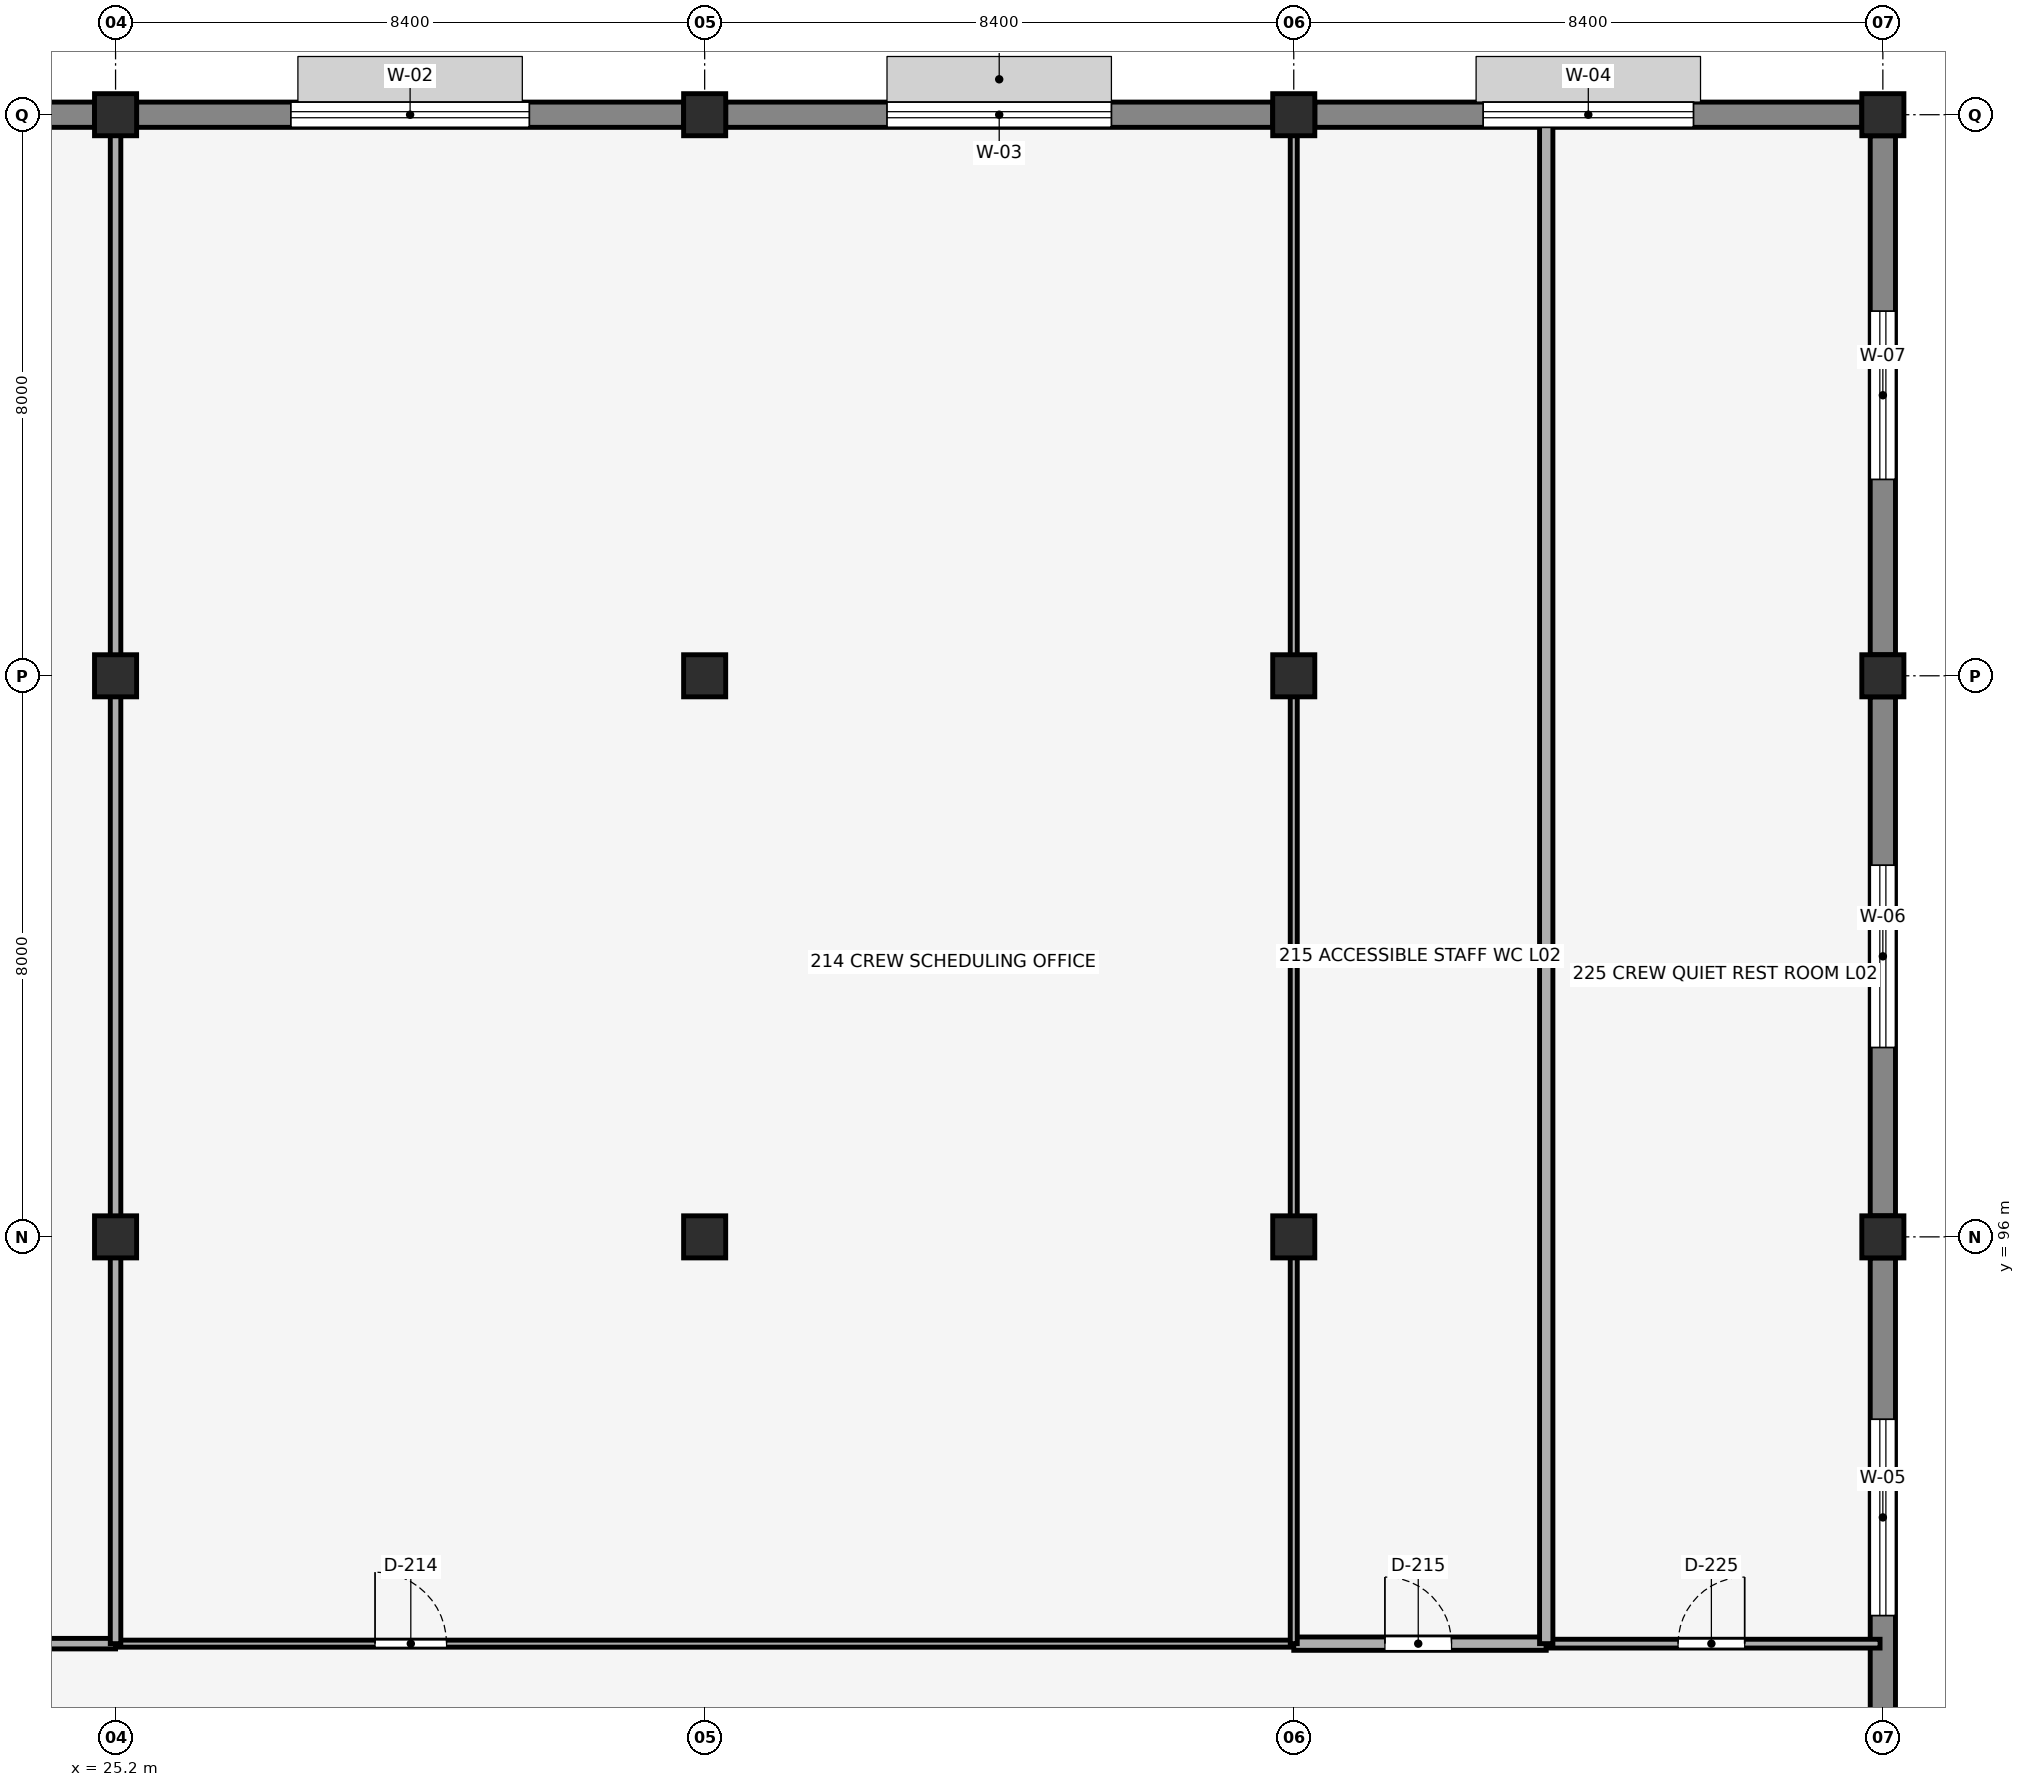
"""IFC4 building model, lengths in metres.
Left out: names, types, materials, properties, quantities, classifications, styles, units other than length and angle.
Written with IfcOpenShell. Run it as: python <this file> out.ifc"""

import sys

from ifc_helpers import new_model, si_unit, direction, frame, frame_2d, origin, origin_2d, place, context, subcontext, project, spatial, rectangle, extrude, element, fill, save


model = new_model("IFC4")
c1 = context("Model", 3, precision=1e-05, world=origin(), true_north=direction((0.0, 1.0)))
c2 = subcontext(c1, "Body", "Model", "MODEL_VIEW")
j1 = project(units=[si_unit("LENGTHUNIT", "METRE"), si_unit("PLANEANGLEUNIT", "RADIAN")], contexts=[c1])
p1 = place(None, origin())
s1 = spatial("IfcSite", under=j1, at=p1, CompositionType="ELEMENT")
p2 = place(p1, origin())
s2 = spatial("IfcBuilding", under=s1, at=p2, CompositionType="ELEMENT")
p3 = place(p2, frame((0.0, 0.0, 9.52)))
s3 = spatial("IfcBuildingStorey", under=s2, at=p3, CompositionType="ELEMENT", Elevation=9.52)
for number, where, z_axis, x_axis in (
    (1, (25.2, 96.0, 0.0), (0.0, 0.0, 1.0), (1.0, 0.0, 0.0)),
    (2, (25.2, 104.0, 0.0), (0.0, 0.0, 1.0), (1.0, 0.0, 0.0)),
    (3, (25.2, 112.0, 0.0), (0.0, 0.0, 1.0), (1.0, 0.0, 0.0)),
    (4, (33.6, 96.0, 0.0), (0.0, 0.0, 1.0), (1.0, 0.0, 0.0)),
    (5, (33.6, 104.0, 0.0), (0.0, 0.0, 1.0), (1.0, 0.0, 0.0)),
    (6, (33.6, 112.0, 0.0), (0.0, 0.0, 1.0), (1.0, 0.0, 0.0)),
    (7, (42.0, 96.0, 0.0), (0.0, 0.0, 1.0), (1.0, 0.0, 0.0)),
    (8, (42.0, 104.0, 0.0), (0.0, 0.0, 1.0), (1.0, 0.0, 0.0)),
    (9, (42.0, 112.0, 0.0), (0.0, 0.0, 1.0), (1.0, 0.0, 0.0)),
    (10, (50.4, 96.0, 0.0), (0.0, 0.0, 1.0), (1.0, 0.0, 0.0)),
    (11, (50.4, 104.0, 0.0), (0.0, 0.0, 1.0), (1.0, 0.0, 0.0)),
    (12, (50.4, 112.0, 0.0), (0.0, 0.0, 1.0), (1.0, 0.0, 0.0)),
):
    element("IfcColumn", number, at=place(p3, frame(where, z_axis=z_axis, x_axis=x_axis)), inside=s3, PredefinedType="COLUMN", context=c2, shape_type="SweptSolid", body=[
        extrude(rectangle(XDim=0.6, YDim=0.6, at=origin_2d()), origin(), (0.0, 0.0, 1.0), 3.57),
    ])
p4 = place(p3, frame((33.9, 112.0, 0.0), z_axis=(0.0, 0.0, 1.0), x_axis=(1.0, 0.0, 0.0)))
e13 = element("IfcWall", 13, at=p4, inside=s3, PredefinedType="SOLIDWALL", context=c2, shape_type="SweptSolid", body=[
    extrude(rectangle(XDim=7.8, YDim=0.36, at=frame_2d((3.9, 0.0))), origin(), (0.0, 0.0, 1.0), 3.27),
])
p5 = place(p4, frame((2.3, 0.0, 0.9), z_axis=(0.0, 0.0, 1.0), x_axis=(1.0, 0.0, 0.0)))
e14 = element("IfcOpeningElement", 14, at=p5, cuts=e13, PredefinedType="OPENING", context=c2, shape_type="SweptSolid", body=[
    extrude(rectangle(XDim=3.2, YDim=1.65, at=frame_2d((1.6, 0.825))), frame((0.0, 0.19, 0.0), z_axis=(0.0, -1.0, 0.0), x_axis=(1.0, 0.0, 0.0)), (0.0, 0.0, 1.0), 0.38),
])
p6 = place(p3, frame((42.3, 112.0, 0.0), z_axis=(0.0, 0.0, 1.0), x_axis=(1.0, 0.0, 0.0)))
e15 = element("IfcWall", 15, at=p6, inside=s3, PredefinedType="SOLIDWALL", context=c2, shape_type="SweptSolid", body=[
    extrude(rectangle(XDim=7.8, YDim=0.36, at=frame_2d((3.9, 0.0))), origin(), (0.0, 0.0, 1.0), 3.27),
])
p7 = place(p6, frame((2.4, 0.0, 0.9), z_axis=(0.0, 0.0, 1.0), x_axis=(1.0, 0.0, 0.0)))
e16 = element("IfcOpeningElement", 16, at=p7, cuts=e15, PredefinedType="OPENING", context=c2, shape_type="SweptSolid", body=[
    extrude(rectangle(XDim=3.0, YDim=1.65, at=frame_2d((1.5, 0.825))), frame((0.0, 0.19, 0.0), z_axis=(0.0, -1.0, 0.0), x_axis=(1.0, 0.0, 0.0)), (0.0, 0.0, 1.0), 0.38),
])
p8 = place(p3, frame((50.4, 88.3, 0.0), z_axis=(0.0, 0.0, 1.0), x_axis=(0.0, 1.0, 0.0)))
e17 = element("IfcWall", 17, at=p8, inside=s3, PredefinedType="SOLIDWALL", context=c2, shape_type="SweptSolid", body=[
    extrude(rectangle(XDim=7.4, YDim=0.36, at=frame_2d((3.7, 0.0))), origin(), (0.0, 0.0, 1.0), 3.219),
])
p9 = place(p8, frame((2.3, 0.0, 0.9), z_axis=(0.0, 0.0, 1.0), x_axis=(1.0, 0.0, 0.0)))
e18 = element("IfcOpeningElement", 18, at=p9, cuts=e17, PredefinedType="OPENING", context=c2, shape_type="SweptSolid", body=[
    extrude(rectangle(XDim=2.8, YDim=1.6, at=frame_2d((1.4, 0.8))), frame((0.0, 0.19, 0.0), z_axis=(0.0, -1.0, 0.0), x_axis=(1.0, 0.0, 0.0)), (0.0, 0.0, 1.0), 0.38),
])
p10 = place(p3, frame((50.4, 96.3, 0.0), z_axis=(0.0, 0.0, 1.0), x_axis=(0.0, 1.0, 0.0)))
e19 = element("IfcWall", 19, at=p10, inside=s3, PredefinedType="SOLIDWALL", context=c2, shape_type="SweptSolid", body=[
    extrude(rectangle(XDim=7.4, YDim=0.36, at=frame_2d((3.7, 0.0))), origin(), (0.0, 0.0, 1.0), 3.219),
])
p11 = place(p10, frame((2.4, 0.0, 0.9), z_axis=(0.0, 0.0, 1.0), x_axis=(1.0, 0.0, 0.0)))
e20 = element("IfcOpeningElement", 20, at=p11, cuts=e19, PredefinedType="OPENING", context=c2, shape_type="SweptSolid", body=[
    extrude(rectangle(XDim=2.6, YDim=1.8, at=frame_2d((1.3, 0.9))), frame((0.0, 0.19, 0.0), z_axis=(0.0, -1.0, 0.0), x_axis=(1.0, 0.0, 0.0)), (0.0, 0.0, 1.0), 0.38),
])
p12 = place(p3, frame((50.4, 104.3, 0.0), z_axis=(0.0, 0.0, 1.0), x_axis=(0.0, 1.0, 0.0)))
e21 = element("IfcWall", 21, at=p12, inside=s3, PredefinedType="SOLIDWALL", context=c2, shape_type="SweptSolid", body=[
    extrude(rectangle(XDim=7.4, YDim=0.36, at=frame_2d((3.7, 0.0))), origin(), (0.0, 0.0, 1.0), 3.219),
])
p13 = place(p12, frame((2.5, 0.0, 0.9), z_axis=(0.0, 0.0, 1.0), x_axis=(1.0, 0.0, 0.0)))
e22 = element("IfcOpeningElement", 22, at=p13, cuts=e21, PredefinedType="OPENING", context=c2, shape_type="SweptSolid", body=[
    extrude(rectangle(XDim=2.4, YDim=1.75, at=frame_2d((1.2, 0.875))), frame((0.0, 0.19, 0.0), z_axis=(0.0, -1.0, 0.0), x_axis=(1.0, 0.0, 0.0)), (0.0, 0.0, 1.0), 0.38),
])
p14 = place(p3, frame((17.1, 112.0, 0.0), z_axis=(0.0, 0.0, 1.0), x_axis=(1.0, 0.0, 0.0)))
e23 = element("IfcWall", 23, at=p14, inside=s3, PredefinedType="SOLIDWALL", context=c2, shape_type="SweptSolid", body=[
    extrude(rectangle(XDim=7.8, YDim=0.36, at=frame_2d((3.9, 0.0))), origin(), (0.0, 0.0, 1.0), 3.27),
])
p15 = place(p14, frame((2.1, 0.0, 0.9), z_axis=(0.0, 0.0, 1.0), x_axis=(1.0, 0.0, 0.0)))
e24 = element("IfcOpeningElement", 24, at=p15, cuts=e23, PredefinedType="OPENING", context=c2, shape_type="SweptSolid", body=[
    extrude(rectangle(XDim=3.6, YDim=1.8, at=frame_2d((1.8, 0.9))), frame((0.0, 0.19, 0.0), z_axis=(0.0, -1.0, 0.0), x_axis=(1.0, 0.0, 0.0)), (0.0, 0.0, 1.0), 0.38),
])
p16 = place(p3, frame((25.5, 112.0, 0.0), z_axis=(0.0, 0.0, 1.0), x_axis=(1.0, 0.0, 0.0)))
e25 = element("IfcWall", 25, at=p16, inside=s3, PredefinedType="SOLIDWALL", context=c2, shape_type="SweptSolid", body=[
    extrude(rectangle(XDim=7.8, YDim=0.36, at=frame_2d((3.9, 0.0))), origin(), (0.0, 0.0, 1.0), 3.27),
])
p17 = place(p16, frame((2.2, 0.0, 0.9), z_axis=(0.0, 0.0, 1.0), x_axis=(1.0, 0.0, 0.0)))
e26 = element("IfcOpeningElement", 26, at=p17, cuts=e25, PredefinedType="OPENING", context=c2, shape_type="SweptSolid", body=[
    extrude(rectangle(XDim=3.4, YDim=1.7, at=frame_2d((1.7, 0.85))), frame((0.0, 0.19, 0.0), z_axis=(0.0, -1.0, 0.0), x_axis=(1.0, 0.0, 0.0)), (0.0, 0.0, 1.0), 0.38),
])
p18 = place(p3, frame((16.8, 90.2, 0.0), z_axis=(0.0, 0.0, 1.0), x_axis=(1.0, 0.0, 0.0)))
e27 = element("IfcWall", 27, at=p18, inside=s3, PredefinedType="PARTITIONING", context=c2, shape_type="SweptSolid", body=[
    extrude(rectangle(XDim=8.4, YDim=0.15, at=frame_2d((4.2, 0.0))), origin(), (0.0, 0.0, 1.0), 3.57),
])
p19 = place(p18, frame((3.7, 0.0, 0.0), z_axis=(0.0, 0.0, 1.0), x_axis=(1.0, 0.0, 0.0)))
e28 = element("IfcOpeningElement", 28, at=p19, cuts=e27, PredefinedType="OPENING", context=c2, shape_type="SweptSolid", body=[
    extrude(rectangle(XDim=1.08, YDim=2.18, at=frame_2d((0.54, 1.09))), frame((0.0, 0.085, 0.0), z_axis=(0.0, -1.0, 0.0), x_axis=(1.0, 0.0, 0.0)), (0.0, 0.0, 1.0), 0.17),
])
p20 = place(p3, frame((25.2, 90.2, 0.0), z_axis=(0.0, 0.0, 1.0), x_axis=(1.0, 0.0, 0.0)))
e29 = element("IfcWall", 29, at=p20, inside=s3, PredefinedType="PARTITIONING", context=c2, shape_type="SweptSolid", body=[
    extrude(rectangle(XDim=16.8, YDim=0.1, at=frame_2d((8.4, 0.0))), origin(), (0.0, 0.0, 1.0), 3.57),
])
p21 = place(p20, frame((3.7, 0.0, 0.0), z_axis=(0.0, 0.0, 1.0), x_axis=(1.0, 0.0, 0.0)))
e30 = element("IfcOpeningElement", 30, at=p21, cuts=e29, PredefinedType="OPENING", context=c2, shape_type="SweptSolid", body=[
    extrude(rectangle(XDim=1.02, YDim=2.16, at=frame_2d((0.51, 1.08))), frame((0.0, 0.06, 0.0), z_axis=(0.0, -1.0, 0.0), x_axis=(1.0, 0.0, 0.0)), (0.0, 0.0, 1.0), 0.12),
])
p22 = place(p3, frame((42.0, 90.2, 0.0), z_axis=(0.0, 0.0, 1.0), x_axis=(1.0, 0.0, 0.0)))
e31 = element("IfcWall", 31, at=p22, inside=s3, PredefinedType="PLUMBINGWALL", context=c2, shape_type="SweptSolid", body=[
    extrude(rectangle(XDim=3.6, YDim=0.19, at=frame_2d((1.8, 0.0))), origin(), (0.0, 0.0, 1.0), 3.57),
])
p23 = place(p22, frame((1.3, 0.0, 0.0), z_axis=(0.0, 0.0, 1.0), x_axis=(1.0, 0.0, 0.0)))
e32 = element("IfcOpeningElement", 32, at=p23, cuts=e31, PredefinedType="OPENING", context=c2, shape_type="SweptSolid", body=[
    extrude(rectangle(XDim=0.95, YDim=2.15, at=frame_2d((0.475, 1.075))), frame((0.0, 0.105, 0.0), z_axis=(0.0, -1.0, 0.0), x_axis=(1.0, 0.0, 0.0)), (0.0, 0.0, 1.0), 0.21),
])
p24 = place(p3, frame((45.6, 90.2, 0.0), z_axis=(0.0, 0.0, 1.0), x_axis=(1.0, 0.0, 0.0)))
e33 = element("IfcWall", 33, at=p24, inside=s3, PredefinedType="PARTITIONING", context=c2, shape_type="SweptSolid", body=[
    extrude(rectangle(XDim=4.76, YDim=0.125, at=frame_2d((2.38, 0.0))), origin(), (0.0, 0.0, 1.0), 3.57),
])
p25 = place(p24, frame((1.88, 0.0, 0.0), z_axis=(0.0, 0.0, 1.0), x_axis=(1.0, 0.0, 0.0)))
e34 = element("IfcOpeningElement", 34, at=p25, cuts=e33, PredefinedType="OPENING", context=c2, shape_type="SweptSolid", body=[
    extrude(rectangle(XDim=0.95, YDim=2.15, at=frame_2d((0.475, 1.075))), frame((0.0, 0.073, 0.0), z_axis=(0.0, -1.0, 0.0), x_axis=(1.0, 0.0, 0.0)), (0.0, 0.0, 1.0), 0.145),
])
p26 = place(p3, frame((25.2, 90.2, 0.0), z_axis=(0.0, 0.0, 1.0), x_axis=(0.0, 1.0, 0.0)))
e35 = element("IfcWall", 35, at=p26, inside=s3, PredefinedType="PARTITIONING", context=c2, shape_type="SweptSolid", body=[
    extrude(rectangle(XDim=5.51, YDim=0.15, at=frame_2d((2.755, 0.0))), origin(), (0.0, 0.0, 1.0), 3.107),
])
for number, where, z_axis, x_axis in (
    (36, (25.2, 96.29, 0.0), (0.0, 0.0, 1.0), (0.0, 1.0, 0.0)),
    (37, (25.2, 104.29, 0.0), (0.0, 0.0, 1.0), (0.0, 1.0, 0.0)),
):
    element("IfcWall", number, at=place(p3, frame(where, z_axis=z_axis, x_axis=x_axis)), inside=s3, PredefinedType="PARTITIONING", context=c2, shape_type="SweptSolid", body=[
        extrude(rectangle(XDim=7.42, YDim=0.15, at=frame_2d((3.71, 0.0))), origin(), (0.0, 0.0, 1.0), 3.107),
    ])
p27 = place(p3, frame((42.0, 90.2, 0.0), z_axis=(0.0, 0.0, 1.0), x_axis=(0.0, 1.0, 0.0)))
e38 = element("IfcWall", 38, at=p27, inside=s3, PredefinedType="PARTITIONING", context=c2, shape_type="SweptSolid", body=[
    extrude(rectangle(XDim=5.51, YDim=0.1, at=frame_2d((2.755, 0.0))), origin(), (0.0, 0.0, 1.0), 3.107),
])
for number, where, z_axis, x_axis in (
    (39, (42.0, 96.29, 0.0), (0.0, 0.0, 1.0), (0.0, 1.0, 0.0)),
    (40, (42.0, 104.29, 0.0), (0.0, 0.0, 1.0), (0.0, 1.0, 0.0)),
):
    element("IfcWall", number, at=place(p3, frame(where, z_axis=z_axis, x_axis=x_axis)), inside=s3, PredefinedType="PARTITIONING", context=c2, shape_type="SweptSolid", body=[
        extrude(rectangle(XDim=7.42, YDim=0.1, at=frame_2d((3.71, 0.0))), origin(), (0.0, 0.0, 1.0), 3.107),
    ])
p28 = place(p3, frame((45.6, 90.2, 0.0), z_axis=(0.0, 0.0, 1.0), x_axis=(0.0, 1.0, 0.0)))
e41 = element("IfcWall", 41, at=p28, inside=s3, PredefinedType="PLUMBINGWALL", context=c2, shape_type="SweptSolid", body=[
    extrude(rectangle(XDim=21.76, YDim=0.19, at=frame_2d((10.88, 0.0))), origin(), (0.0, 0.0, 1.0), 3.57),
])
p29 = place(p5, origin())
e42 = element("IfcWindow", 42, at=p29, inside=s3, PartitioningType="TRIPLE_PANEL_VERTICAL", PredefinedType="WINDOW", context=c2, shape_type="SweptSolid", body=[
    extrude(rectangle(XDim=3.2, YDim=1.65, at=frame_2d((1.6, 0.825))), frame((0.0, 0.03, 0.0), z_axis=(0.0, -1.0, 0.0), x_axis=(1.0, 0.0, 0.0)), (0.0, 0.0, 1.0), 0.06),
])
fill(e14, e42)
p30 = place(p7, origin())
e43 = element("IfcWindow", 43, at=p30, inside=s3, PartitioningType="DOUBLE_PANEL_VERTICAL", PredefinedType="WINDOW", context=c2, shape_type="SweptSolid", body=[
    extrude(rectangle(XDim=3.0, YDim=1.65, at=frame_2d((1.5, 0.825))), frame((0.0, 0.03, 0.0), z_axis=(0.0, -1.0, 0.0), x_axis=(1.0, 0.0, 0.0)), (0.0, 0.0, 1.0), 0.06),
])
fill(e16, e43)
p31 = place(p9, origin())
e44 = element("IfcWindow", 44, at=p31, inside=s3, PartitioningType="DOUBLE_PANEL_VERTICAL", PredefinedType="WINDOW", context=c2, shape_type="SweptSolid", body=[
    extrude(rectangle(XDim=2.8, YDim=1.6, at=frame_2d((1.4, 0.8))), frame((0.0, 0.03, 0.0), z_axis=(0.0, -1.0, 0.0), x_axis=(1.0, 0.0, 0.0)), (0.0, 0.0, 1.0), 0.06),
])
fill(e18, e44)
p32 = place(p11, origin())
e45 = element("IfcWindow", 45, at=p32, inside=s3, PartitioningType="DOUBLE_PANEL_VERTICAL", PredefinedType="WINDOW", context=c2, shape_type="SweptSolid", body=[
    extrude(rectangle(XDim=2.6, YDim=1.8, at=frame_2d((1.3, 0.9))), frame((0.0, 0.03, 0.0), z_axis=(0.0, -1.0, 0.0), x_axis=(1.0, 0.0, 0.0)), (0.0, 0.0, 1.0), 0.06),
])
fill(e20, e45)
p33 = place(p13, origin())
e46 = element("IfcWindow", 46, at=p33, inside=s3, PartitioningType="DOUBLE_PANEL_VERTICAL", PredefinedType="WINDOW", context=c2, shape_type="SweptSolid", body=[
    extrude(rectangle(XDim=2.4, YDim=1.75, at=frame_2d((1.2, 0.875))), frame((0.0, 0.03, 0.0), z_axis=(0.0, -1.0, 0.0), x_axis=(1.0, 0.0, 0.0)), (0.0, 0.0, 1.0), 0.06),
])
fill(e22, e46)
p34 = place(p17, origin())
e47 = element("IfcWindow", 47, at=p34, inside=s3, PartitioningType="TRIPLE_PANEL_VERTICAL", PredefinedType="WINDOW", context=c2, shape_type="SweptSolid", body=[
    extrude(rectangle(XDim=3.4, YDim=1.7, at=frame_2d((1.7, 0.85))), frame((0.0, 0.03, 0.0), z_axis=(0.0, -1.0, 0.0), x_axis=(1.0, 0.0, 0.0)), (0.0, 0.0, 1.0), 0.06),
])
fill(e26, e47)
p35 = place(p21, origin())
e48 = element("IfcDoor", 48, at=p35, inside=s3, OperationType="SINGLE_SWING_LEFT", PredefinedType="DOOR", context=c2, shape_type="SweptSolid", body=[
    extrude(rectangle(XDim=1.02, YDim=2.16, at=frame_2d((0.51, 1.08))), frame((0.0, 0.025, 0.0), z_axis=(0.0, -1.0, 0.0), x_axis=(1.0, 0.0, 0.0)), (0.0, 0.0, 1.0), 0.05),
])
fill(e30, e48)
p36 = place(p23, origin())
e49 = element("IfcDoor", 49, at=p36, inside=s3, OperationType="SINGLE_SWING_LEFT", PredefinedType="DOOR", context=c2, shape_type="SweptSolid", body=[
    extrude(rectangle(XDim=0.95, YDim=2.15, at=frame_2d((0.475, 1.075))), frame((0.0, 0.025, 0.0), z_axis=(0.0, -1.0, 0.0), x_axis=(1.0, 0.0, 0.0)), (0.0, 0.0, 1.0), 0.05),
])
fill(e32, e49)
p37 = place(p25, origin())
e50 = element("IfcDoor", 50, at=p37, inside=s3, OperationType="SINGLE_SWING_RIGHT", PredefinedType="DOOR", context=c2, shape_type="SweptSolid", body=[
    extrude(rectangle(XDim=0.95, YDim=2.15, at=frame_2d((0.475, 1.075))), frame((0.0, 0.025, 0.0), z_axis=(0.0, -1.0, 0.0), x_axis=(1.0, 0.0, 0.0)), (0.0, 0.0, 1.0), 0.05),
])
fill(e34, e50)
save(model, sys.argv[1])
